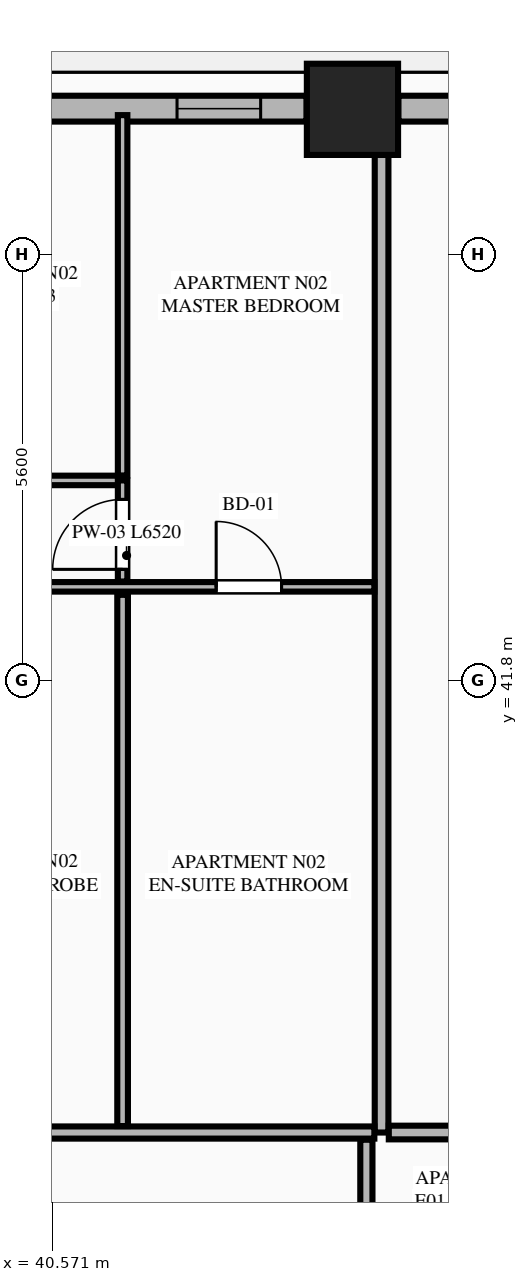
"""IFC4 building model, lengths in metres.
Left out: names, types, materials, properties, quantities, classifications, styles, units other than length and angle.
Written with IfcOpenShell. Run it as: python <this file> out.ifc"""

import sys

from ifc_helpers import new_model, si_unit, direction, frame, frame_2d, origin, origin_2d, place, context, subcontext, project, spatial, rectangle, extrude, element, fill, save


model = new_model("IFC4")
c1 = context("Model", 3, precision=1e-05, world=origin(), true_north=direction((0.0, 1.0)))
c2 = subcontext(c1, "Body", "Model", "MODEL_VIEW")
j1 = project(units=[si_unit("LENGTHUNIT", "METRE"), si_unit("PLANEANGLEUNIT", "RADIAN")], contexts=[c1])
p1 = place(None, origin())
s1 = spatial("IfcSite", under=j1, at=p1, CompositionType="ELEMENT")
p2 = place(p1, origin())
s2 = spatial("IfcBuilding", under=s1, at=p2, CompositionType="ELEMENT")
p3 = place(p2, frame((0.0, 0.0, 63.95)))
s3 = spatial("IfcBuildingStorey", under=s2, at=p3, CompositionType="ELEMENT", Elevation=63.95)
p4 = place(p3, frame((44.517, 49.311, 0.0), z_axis=(0.0, 0.0, 1.0), x_axis=(1.0, 0.0, 0.0)))
e1 = element("IfcColumn", 1, at=p4, inside=s3, PredefinedType="COLUMN", context=c2, shape_type="SweptSolid", body=[
    extrude(rectangle(XDim=1.2, YDim=1.2, at=origin_2d()), origin(), (0.0, 0.0, 1.0), 3.55),
])
p5 = place(p3, frame((46.366, 49.32, 0.0), z_axis=(0.0, 0.0, 1.0), x_axis=(-1.0, 0.0, 0.0)))
e2 = element("IfcWall", 2, at=p5, inside=s3, PredefinedType="STANDARD", context=c2, shape_type="SweptSolid", body=[
    extrude(rectangle(XDim=1.245, YDim=0.34, at=frame_2d((0.623, 0.0))), origin(), (0.0, 0.0, 1.0), 3.33),
])
p6 = place(p3, frame((43.913, 49.32, 0.0), z_axis=(0.0, 0.0, 1.0), x_axis=(-1.0, 0.0, 0.0)))
e3 = element("IfcWall", 3, at=p6, inside=s3, PredefinedType="STANDARD", context=c2, shape_type="SweptSolid", body=[
    extrude(rectangle(XDim=6.787, YDim=0.34, at=frame_2d((3.394, 0.0))), origin(), (0.0, 0.0, 1.0), 2.787),
])
p7 = place(p6, frame((0.604, 0.0, 0.75)))
e4 = element("IfcOpeningElement", 4, at=p7, cuts=e3, PredefinedType="OPENING", context=c2, shape_type="SweptSolid", body=[
    extrude(rectangle(XDim=1.1, YDim=1.887, at=frame_2d((0.55, 0.943))), frame((0.0, 0.18, 0.0), z_axis=(0.0, -1.0, 0.0), x_axis=(1.0, 0.0, 0.0)), (0.0, 0.0, 1.0), 0.36),
])
p8 = place(p6, frame((3.474, 0.0, 0.75)))
e5 = element("IfcOpeningElement", 5, at=p8, cuts=e3, PredefinedType="OPENING", context=c2, shape_type="SweptSolid", body=[
    extrude(rectangle(XDim=1.1, YDim=1.887, at=frame_2d((0.55, 0.943))), frame((0.0, 0.18, 0.0), z_axis=(0.0, -1.0, 0.0), x_axis=(1.0, 0.0, 0.0)), (0.0, 0.0, 1.0), 0.36),
])
p9 = place(p6, frame((5.861, 0.0, 0.75)))
e6 = element("IfcOpeningElement", 6, at=p9, cuts=e3, PredefinedType="OPENING", context=c2, shape_type="SweptSolid", body=[
    extrude(rectangle(XDim=0.716, YDim=1.887, at=frame_2d((0.358, 0.943))), frame((0.0, 0.18, 0.0), z_axis=(0.0, -1.0, 0.0), x_axis=(1.0, 0.0, 0.0)), (0.0, 0.0, 1.0), 0.36),
])
p10 = place(p3, frame((44.9, 35.85, 0.0), z_axis=(0.0, 0.0, 1.0), x_axis=(0.0, 1.0, 0.0)))
e7 = element("IfcWall", 7, at=p10, inside=s3, PredefinedType="PARTITIONING", context=c2, shape_type="SweptSolid", body=[
    extrude(rectangle(XDim=13.295, YDim=0.18, at=frame_2d((6.647, 0.0))), origin(), (0.0, 0.0, 1.0), 3.33),
])
p11 = place(p3, frame((28.373, 35.85, 0.0), z_axis=(0.0, 0.0, 1.0), x_axis=(1.0, 0.0, 0.0)))
e8 = element("IfcWall", 8, at=p11, inside=s3, PredefinedType="PARTITIONING", context=c2, shape_type="SweptSolid", body=[
    extrude(rectangle(XDim=16.432, YDim=0.16, at=frame_2d((8.216, 0.0))), origin(), (0.0, 0.0, 1.0), 3.33),
])
p12 = place(p11, frame((0.355, 0.0, 0.0)))
e9 = element("IfcOpeningElement", 9, at=p12, cuts=e8, PredefinedType="OPENING", context=c2, shape_type="SweptSolid", body=[
    extrude(rectangle(XDim=1.35, YDim=2.35, at=frame_2d((0.675, 1.175))), frame((0.0, 0.09, 0.0), z_axis=(0.0, -1.0, 0.0), x_axis=(1.0, 0.0, 0.0)), (0.0, 0.0, 1.0), 0.18),
])
p13 = place(p3, frame((38.285, 43.029, 0.0), z_axis=(0.0, 0.0, 1.0), x_axis=(1.0, 0.0, 0.0)))
e10 = element("IfcWall", 10, at=p13, inside=s3, PredefinedType="PARTITIONING", context=c2, shape_type="SweptSolid", body=[
    extrude(rectangle(XDim=6.52, YDim=0.125, at=frame_2d((3.26, 0.0))), origin(), (0.0, 0.0, 1.0), 3.33),
])
p14 = place(p13, frame((4.439, 0.0, 0.0)))
e11 = element("IfcOpeningElement", 11, at=p14, cuts=e10, PredefinedType="OPENING", context=c2, shape_type="SweptSolid", body=[
    extrude(rectangle(XDim=0.86, YDim=2.1, at=frame_2d((0.43, 1.05))), frame((0.0, 0.073, 0.0), z_axis=(0.0, -1.0, 0.0), x_axis=(1.0, 0.0, 0.0)), (0.0, 0.0, 1.0), 0.145),
])
p15 = place(p13, frame((0.3, 0.0, 0.0)))
e12 = element("IfcOpeningElement", 12, at=p15, cuts=e10, PredefinedType="OPENING", context=c2, shape_type="SweptSolid", body=[
    extrude(rectangle(XDim=0.88, YDim=2.15, at=frame_2d((0.44, 1.075))), frame((0.0, 0.073, 0.0), z_axis=(0.0, -1.0, 0.0), x_axis=(1.0, 0.0, 0.0)), (0.0, 0.0, 1.0), 0.145),
])
p16 = place(p3, frame((34.878, 44.429, 0.0), z_axis=(0.0, 0.0, 1.0), x_axis=(1.0, 0.0, 0.0)))
e13 = element("IfcWall", 13, at=p16, inside=s3, PredefinedType="PARTITIONING", context=c2, shape_type="SweptSolid", body=[
    extrude(rectangle(XDim=6.615, YDim=0.125, at=frame_2d((3.308, 0.0))), origin(), (0.0, 0.0, 1.0), 3.33),
])
p17 = place(p16, frame((0.35, 0.0, 0.0)))
e14 = element("IfcOpeningElement", 14, at=p17, cuts=e13, PredefinedType="OPENING", context=c2, shape_type="SweptSolid", body=[
    extrude(rectangle(XDim=0.92, YDim=2.15, at=frame_2d((0.46, 1.075))), frame((0.0, 0.073, 0.0), z_axis=(0.0, -1.0, 0.0), x_axis=(1.0, 0.0, 0.0)), (0.0, 0.0, 1.0), 0.145),
])
p18 = place(p16, frame((3.757, 0.0, 0.0)))
e15 = element("IfcOpeningElement", 15, at=p18, cuts=e13, PredefinedType="OPENING", context=c2, shape_type="SweptSolid", body=[
    extrude(rectangle(XDim=0.92, YDim=2.15, at=frame_2d((0.46, 1.075))), frame((0.0, 0.073, 0.0), z_axis=(0.0, -1.0, 0.0), x_axis=(1.0, 0.0, 0.0)), (0.0, 0.0, 1.0), 0.145),
])
p19 = place(p3, frame((41.493, 43.099, 0.0), z_axis=(0.0, 0.0, 1.0), x_axis=(0.0, 1.0, 0.0)))
e16 = element("IfcWall", 16, at=p19, inside=s3, PredefinedType="PARTITIONING", context=c2, shape_type="SweptSolid", body=[
    extrude(rectangle(XDim=1.33, YDim=0.125, at=frame_2d((0.665, 0.0))), origin(), (0.0, 0.0, 1.0), 3.33),
])
p20 = place(p19, frame((0.16, 0.0, 0.0)))
e17 = element("IfcOpeningElement", 17, at=p20, cuts=e16, PredefinedType="OPENING", context=c2, shape_type="SweptSolid", body=[
    extrude(rectangle(XDim=0.92, YDim=2.15, at=frame_2d((0.46, 1.075))), frame((0.0, 0.073, 0.0), z_axis=(0.0, -1.0, 0.0), x_axis=(1.0, 0.0, 0.0)), (0.0, 0.0, 1.0), 0.145),
])
p21 = place(p3, frame((41.493, 44.494, 0.0), z_axis=(0.0, 0.0, 1.0), x_axis=(0.0, 1.0, 0.0)))
e18 = element("IfcWall", 18, at=p21, inside=s3, PredefinedType="PARTITIONING", context=c2, shape_type="SweptSolid", body=[
    extrude(rectangle(XDim=4.741, YDim=0.125, at=frame_2d((2.371, 0.0))), origin(), (0.0, 0.0, 1.0), 3.33),
])
p22 = place(p3, frame((41.493, 35.935, 0.0), z_axis=(0.0, 0.0, 1.0), x_axis=(0.0, 1.0, 0.0)))
e19 = element("IfcWall", 19, at=p22, inside=s3, PredefinedType="PLUMBINGWALL", context=c2, shape_type="SweptSolid", body=[
    extrude(rectangle(XDim=6.989, YDim=0.14, at=frame_2d((3.495, 0.0))), origin(), (0.0, 0.0, 1.0), 3.33),
])
p23 = place(p3, frame((44.995, 35.85, 0.0), z_axis=(0.0, 0.0, 1.0), x_axis=(1.0, 0.0, 0.0)))
e20 = element("IfcWall", 20, at=p23, inside=s3, PredefinedType="PARTITIONING", context=c2, shape_type="SweptSolid", body=[
    extrude(rectangle(XDim=9.14, YDim=0.18, at=frame_2d((4.57, 0.0))), origin(), (0.0, 0.0, 1.0), 3.33),
])
p24 = place(p3, frame((44.7, 16.045, 0.0), z_axis=(0.0, 0.0, 1.0), x_axis=(0.0, 1.0, 0.0)))
e21 = element("IfcWall", 21, at=p24, inside=s3, PredefinedType="PARTITIONING", context=c2, shape_type="SweptSolid", body=[
    extrude(rectangle(XDim=19.71, YDim=0.16, at=frame_2d((9.855, 0.0))), origin(), (0.0, 0.0, 1.0), 2.7),
])
p25 = place(p24, frame((0.45, 0.0, 0.0)))
e22 = element("IfcOpeningElement", 22, at=p25, cuts=e21, PredefinedType="OPENING", context=c2, shape_type="SweptSolid", body=[
    extrude(rectangle(XDim=1.02, YDim=2.25, at=frame_2d((0.51, 1.125))), frame((0.0, 0.09, 0.0), z_axis=(0.0, -1.0, 0.0), x_axis=(1.0, 0.0, 0.0)), (0.0, 0.0, 1.0), 0.18),
])
p26 = place(p7, origin())
e23 = element("IfcWindow", 23, at=p26, inside=s3, PartitioningType="SINGLE_PANEL", PredefinedType="WINDOW", context=c2, shape_type="SweptSolid", body=[
    extrude(rectangle(XDim=1.1, YDim=1.887, at=frame_2d((0.55, 0.943))), frame((0.0, 0.03, 0.0), z_axis=(0.0, -1.0, 0.0), x_axis=(1.0, 0.0, 0.0)), (0.0, 0.0, 1.0), 0.06),
])
fill(e4, e23)
p27 = place(p14, origin())
e24 = element("IfcDoor", 24, at=p27, inside=s3, OperationType="SINGLE_SWING_LEFT", PredefinedType="DOOR", context=c2, shape_type="SweptSolid", body=[
    extrude(rectangle(XDim=0.86, YDim=2.1, at=frame_2d((0.43, 1.05))), frame((0.0, 0.025, 0.0), z_axis=(0.0, -1.0, 0.0), x_axis=(1.0, 0.0, 0.0)), (0.0, 0.0, 1.0), 0.05),
])
fill(e11, e24)
p28 = place(p20, origin())
e25 = element("IfcDoor", 25, at=p28, inside=s3, OperationType="SINGLE_SWING_LEFT", PredefinedType="DOOR", context=c2, shape_type="SweptSolid", body=[
    extrude(rectangle(XDim=0.92, YDim=2.15, at=frame_2d((0.46, 1.075))), frame((0.0, 0.025, 0.0), z_axis=(0.0, -1.0, 0.0), x_axis=(1.0, 0.0, 0.0)), (0.0, 0.0, 1.0), 0.05),
])
fill(e17, e25)
save(model, sys.argv[1])
